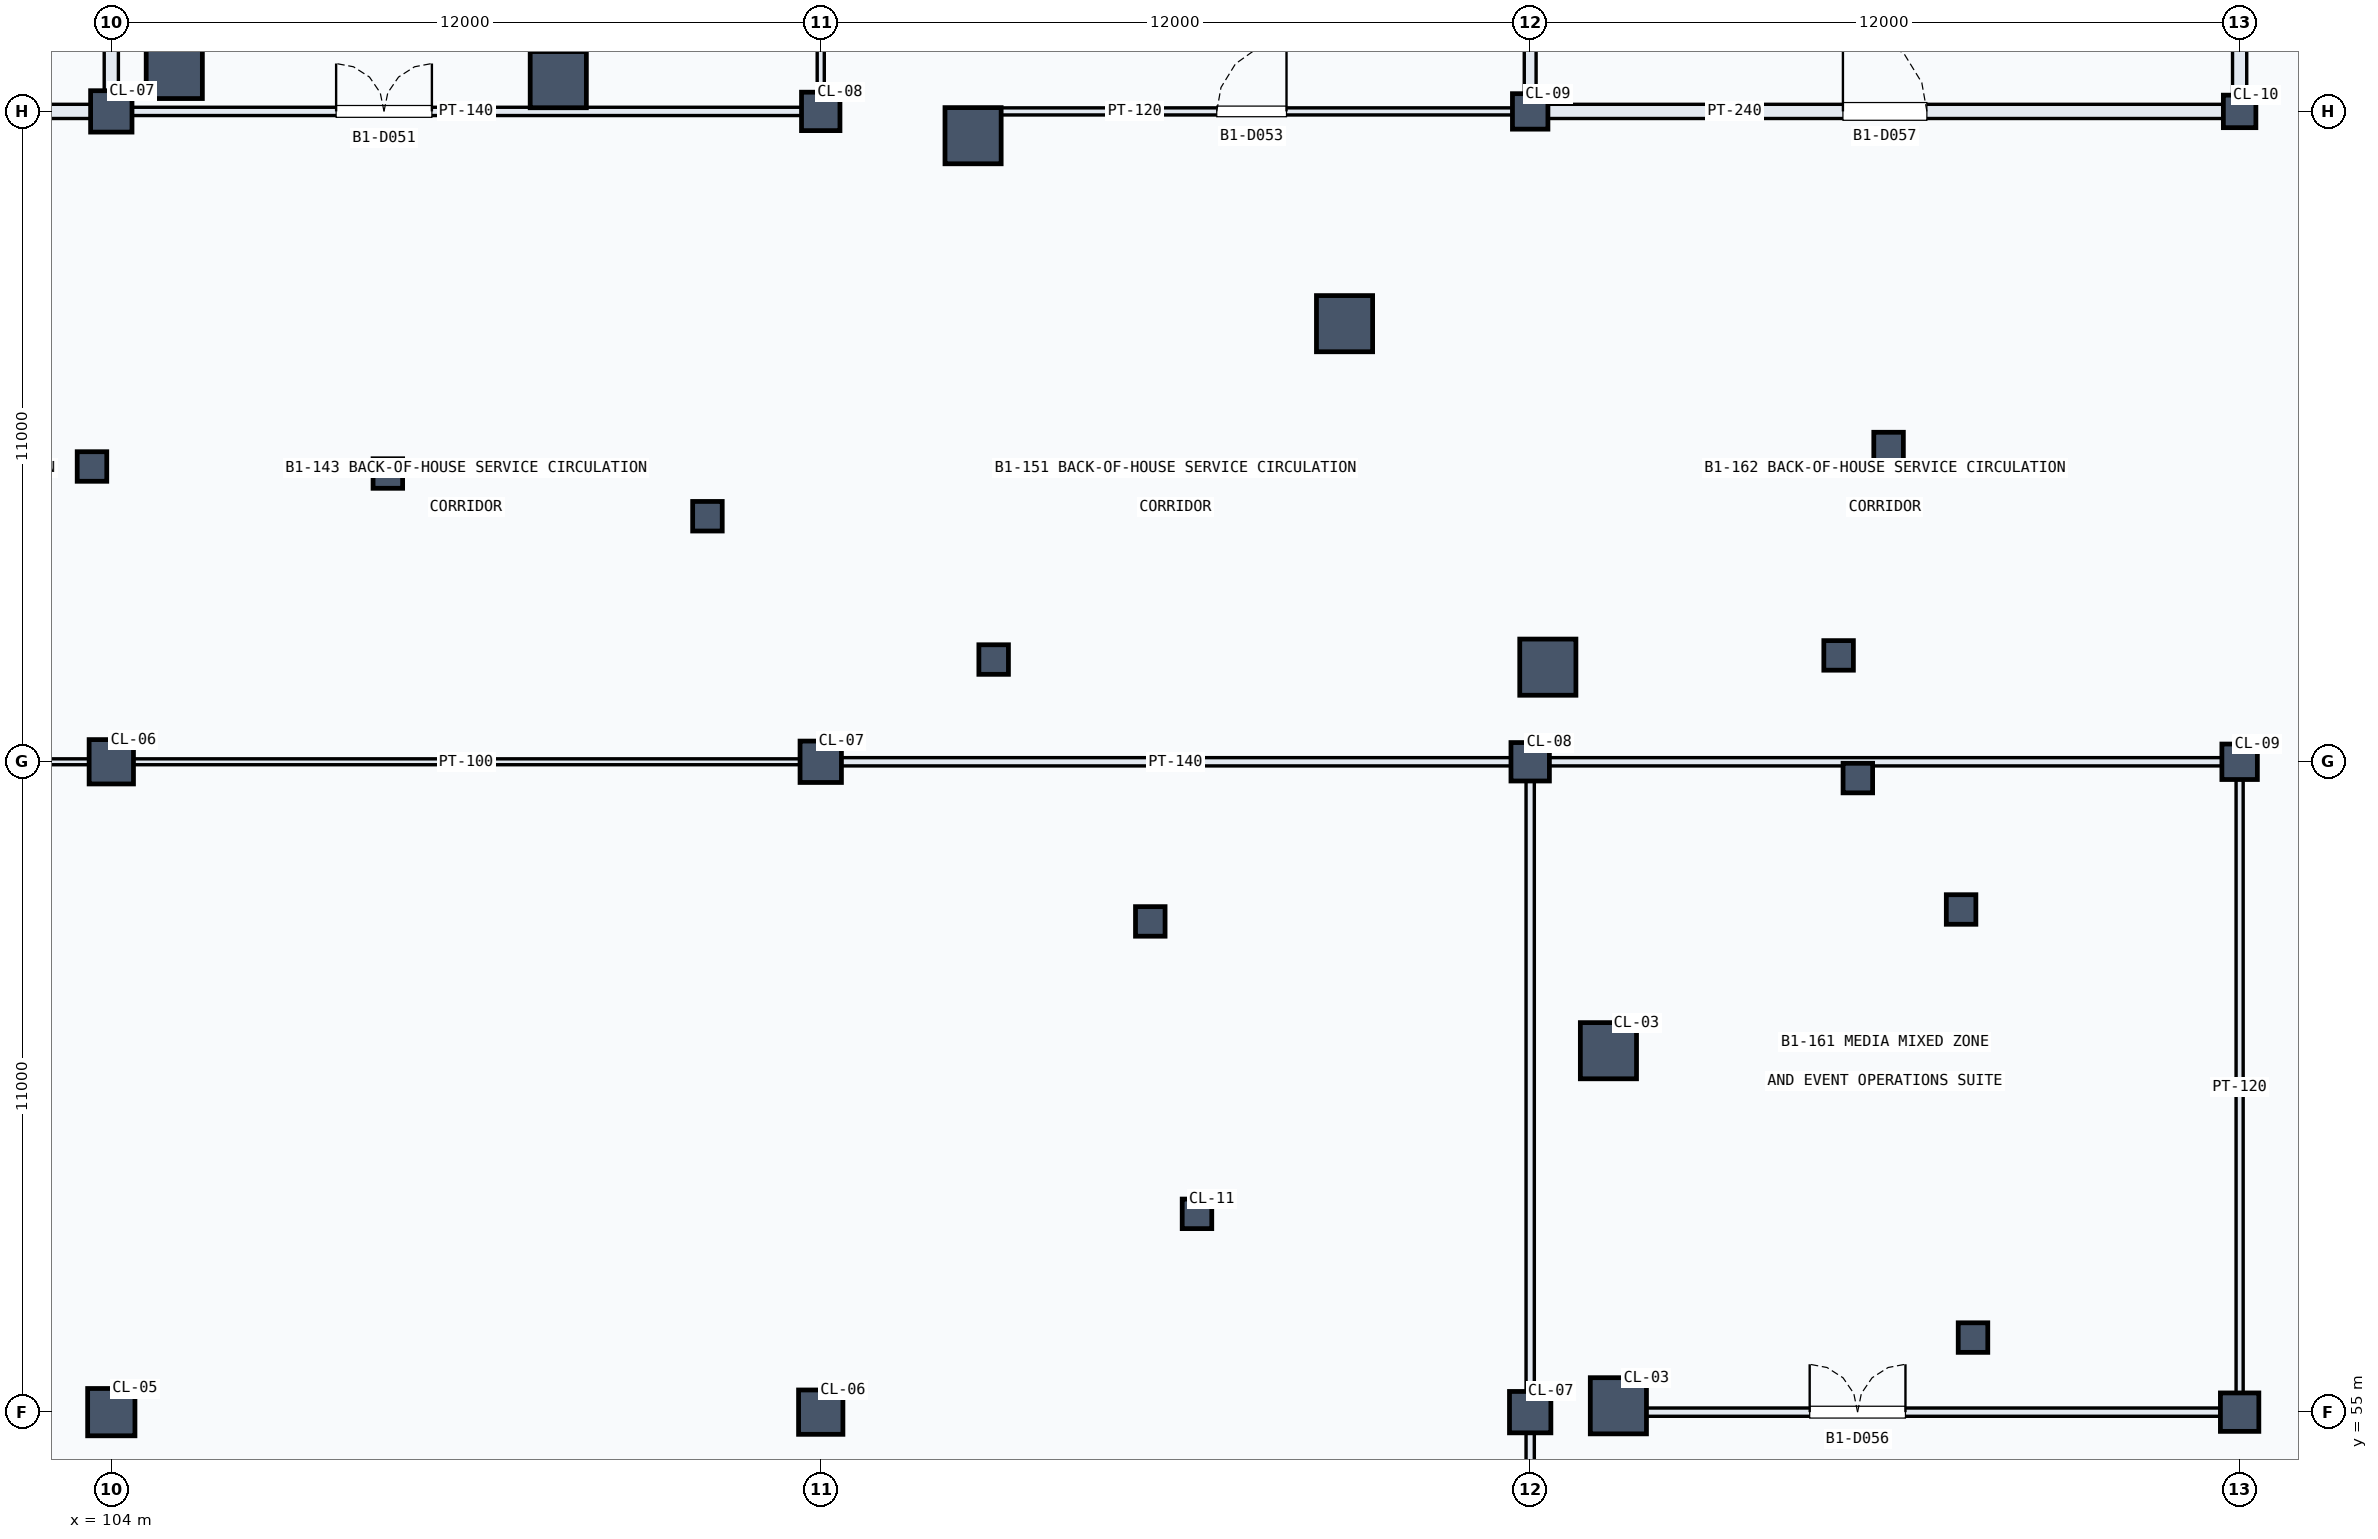
"""IFC4 building model, lengths in metres.
Left out: names, types, materials, properties, quantities, classifications, styles, units other than length and angle.
Written with IfcOpenShell. Run it as: python <this file> out.ifc"""

import sys

from ifc_helpers import new_model, si_unit, direction, frame, frame_2d, origin, origin_2d, place, context, subcontext, project, spatial, rectangle, extrude, element, fill, save


model = new_model("IFC4")
c1 = context("Model", 3, precision=1e-05, world=origin(), true_north=direction((0.0, 1.0)))
c2 = subcontext(c1, "Body", "Model", "MODEL_VIEW")
j1 = project(units=[si_unit("LENGTHUNIT", "METRE"), si_unit("PLANEANGLEUNIT", "RADIAN")], contexts=[c1])
p1 = place(None, origin())
s1 = spatial("IfcSite", under=j1, at=p1, CompositionType="ELEMENT")
p2 = place(p1, origin())
s2 = spatial("IfcBuilding", under=s1, at=p2, CompositionType="ELEMENT")
p3 = place(p2, frame((0.0, 0.0, -5.4)))
s3 = spatial("IfcBuildingStorey", under=s2, at=p3, CompositionType="ELEMENT", Elevation=-5.4)
p4 = place(p3, frame((104.0, 55.0, 0.0), z_axis=(0.0, 0.0, 1.0), x_axis=(1.0, 0.0, 0.0)))
e1 = element("IfcColumn", 1, at=p4, inside=s3, PredefinedType="COLUMN", context=c2, shape_type="SweptSolid", body=[
    extrude(rectangle(XDim=0.8, YDim=0.8, at=origin_2d()), origin(), (0.0, 0.0, 1.0), 5.4),
])
p5 = place(p3, frame((104.0, 66.0, 0.0), z_axis=(0.0, 0.0, 1.0), x_axis=(1.0, 0.0, 0.0)))
e2 = element("IfcColumn", 2, at=p5, inside=s3, PredefinedType="COLUMN", context=c2, shape_type="SweptSolid", body=[
    extrude(rectangle(XDim=0.75, YDim=0.75, at=origin_2d()), origin(), (0.0, 0.0, 1.0), 5.4),
])
p6 = place(p3, frame((104.0, 77.0, 0.0), z_axis=(0.0, 0.0, 1.0), x_axis=(1.0, 0.0, 0.0)))
e3 = element("IfcColumn", 3, at=p6, inside=s3, PredefinedType="COLUMN", context=c2, shape_type="SweptSolid", body=[
    extrude(rectangle(XDim=0.7, YDim=0.7, at=origin_2d()), origin(), (0.0, 0.0, 1.0), 5.4),
])
p7 = place(p3, frame((116.0, 55.0, 0.0), z_axis=(0.0, 0.0, 1.0), x_axis=(1.0, 0.0, 0.0)))
e4 = element("IfcColumn", 4, at=p7, inside=s3, PredefinedType="COLUMN", context=c2, shape_type="SweptSolid", body=[
    extrude(rectangle(XDim=0.75, YDim=0.75, at=origin_2d()), origin(), (0.0, 0.0, 1.0), 5.4),
])
p8 = place(p3, frame((116.0, 66.0, 0.0), z_axis=(0.0, 0.0, 1.0), x_axis=(1.0, 0.0, 0.0)))
e5 = element("IfcColumn", 5, at=p8, inside=s3, PredefinedType="COLUMN", context=c2, shape_type="SweptSolid", body=[
    extrude(rectangle(XDim=0.7, YDim=0.7, at=origin_2d()), origin(), (0.0, 0.0, 1.0), 5.4),
])
p9 = place(p3, frame((116.0, 77.0, 0.0), z_axis=(0.0, 0.0, 1.0), x_axis=(1.0, 0.0, 0.0)))
e6 = element("IfcColumn", 6, at=p9, inside=s3, PredefinedType="COLUMN", context=c2, shape_type="SweptSolid", body=[
    extrude(rectangle(XDim=0.65, YDim=0.65, at=origin_2d()), origin(), (0.0, 0.0, 1.0), 5.4),
])
p10 = place(p3, frame((128.0, 55.0, 0.0), z_axis=(0.0, 0.0, 1.0), x_axis=(1.0, 0.0, 0.0)))
e7 = element("IfcColumn", 7, at=p10, inside=s3, PredefinedType="COLUMN", context=c2, shape_type="SweptSolid", body=[
    extrude(rectangle(XDim=0.7, YDim=0.7, at=origin_2d()), origin(), (0.0, 0.0, 1.0), 5.4),
])
p11 = place(p3, frame((128.0, 66.0, 0.0), z_axis=(0.0, 0.0, 1.0), x_axis=(1.0, 0.0, 0.0)))
e8 = element("IfcColumn", 8, at=p11, inside=s3, PredefinedType="COLUMN", context=c2, shape_type="SweptSolid", body=[
    extrude(rectangle(XDim=0.65, YDim=0.65, at=origin_2d()), origin(), (0.0, 0.0, 1.0), 5.4),
])
p12 = place(p3, frame((128.0, 77.0, 0.0), z_axis=(0.0, 0.0, 1.0), x_axis=(1.0, 0.0, 0.0)))
e9 = element("IfcColumn", 9, at=p12, inside=s3, PredefinedType="COLUMN", context=c2, shape_type="SweptSolid", body=[
    extrude(rectangle(XDim=0.6, YDim=0.6, at=origin_2d()), origin(), (0.0, 0.0, 1.0), 5.4),
])
p13 = place(p3, frame((140.0, 55.0, 0.0), z_axis=(0.0, 0.0, 1.0), x_axis=(1.0, 0.0, 0.0)))
e10 = element("IfcColumn", 10, at=p13, inside=s3, PredefinedType="COLUMN", context=c2, shape_type="SweptSolid", body=[
    extrude(rectangle(XDim=0.65, YDim=0.65, at=origin_2d()), origin(), (0.0, 0.0, 1.0), 5.4),
])
p14 = place(p3, frame((140.0, 66.0, 0.0), z_axis=(0.0, 0.0, 1.0), x_axis=(1.0, 0.0, 0.0)))
e11 = element("IfcColumn", 11, at=p14, inside=s3, PredefinedType="COLUMN", context=c2, shape_type="SweptSolid", body=[
    extrude(rectangle(XDim=0.6, YDim=0.6, at=origin_2d()), origin(), (0.0, 0.0, 1.0), 5.4),
])
p15 = place(p3, frame((140.0, 77.0, 0.0), z_axis=(0.0, 0.0, 1.0), x_axis=(1.0, 0.0, 0.0)))
e12 = element("IfcColumn", 12, at=p15, inside=s3, PredefinedType="COLUMN", context=c2, shape_type="SweptSolid", body=[
    extrude(rectangle(XDim=0.55, YDim=0.55, at=origin_2d()), origin(), (0.0, 0.0, 1.0), 5.4),
])
for number, where, z_axis, x_axis in (
    (13, (122.364, 58.354, 0.0), (0.0, 0.0, 1.0), (1.0, 0.0, 0.0)),
    (14, (121.574, 63.3, 0.0), (0.0, 0.0, 1.0), (1.0, 0.0, 0.0)),
    (15, (118.925, 67.729, 0.0), (0.0, 0.0, 1.0), (1.0, 0.0, 0.0)),
    (16, (114.083, 70.153, 0.0), (0.0, 0.0, 1.0), (1.0, 0.0, 0.0)),
    (17, (108.678, 70.875, 0.0), (0.0, 0.0, 1.0), (1.0, 0.0, 0.0)),
    (18, (103.673, 70.994, 0.0), (0.0, 0.0, 1.0), (1.0, 0.0, 0.0)),
    (19, (135.49, 56.261, 0.0), (0.0, 0.0, 1.0), (1.0, 0.0, 0.0)),
    (20, (135.289, 63.502, 0.0), (0.0, 0.0, 1.0), (1.0, 0.0, 0.0)),
    (21, (134.062, 71.323, 0.0), (0.0, 0.0, 1.0), (1.0, 0.0, 0.0)),
):
    element("IfcColumn", number, at=place(p3, frame(where, z_axis=z_axis, x_axis=x_axis)), inside=s3, PredefinedType="COLUMN", context=c2, shape_type="SweptSolid", body=[
        extrude(rectangle(XDim=0.5, YDim=0.5, at=origin_2d()), origin(), (0.0, 0.0, 1.0), 5.4),
    ])
for number, where, z_axis, x_axis in (
    (22, (129.492, 55.108, 0.0), (0.0, 0.0, 1.0), (1.0, 0.0, 0.0)),
    (23, (129.323, 61.113, 0.0), (0.0, 0.0, 1.0), (1.0, 0.0, 0.0)),
    (24, (128.299, 67.6, 0.0), (0.0, 0.0, 1.0), (1.0, 0.0, 0.0)),
    (25, (124.86, 73.41, 0.0), (0.0, 0.0, 1.0), (1.0, 0.0, 0.0)),
    (26, (118.577, 76.589, 0.0), (0.0, 0.0, 1.0), (1.0, 0.0, 0.0)),
    (27, (111.56, 77.537, 0.0), (0.0, 0.0, 1.0), (1.0, 0.0, 0.0)),
    (28, (105.065, 77.692, 0.0), (0.0, 0.0, 1.0), (1.0, 0.0, 0.0)),
):
    element("IfcColumn", number, at=place(p3, frame(where, z_axis=z_axis, x_axis=x_axis)), inside=s3, PredefinedType="COLUMN", context=c2, shape_type="SweptSolid", body=[
        extrude(rectangle(XDim=0.95, YDim=0.95, at=origin_2d()), origin(), (0.0, 0.0, 1.0), 5.4),
    ])
for number, where, z_axis, x_axis in (
    (29, (133.542, 65.725, 0.0), (0.0, 0.0, 1.0), (1.0, 0.0, 0.0)),
    (30, (133.217, 67.799, 0.0), (0.0, 0.0, 1.0), (1.0, 0.0, 0.0)),
):
    element("IfcColumn", number, at=place(p3, frame(where, z_axis=z_axis, x_axis=x_axis)), inside=s3, PredefinedType="COLUMN", context=c2, shape_type="SweptSolid", body=[
        extrude(rectangle(XDim=0.5, YDim=0.5, at=origin_2d()), origin(), (0.0, 0.0, 1.0), 5.4),
    ])
p16 = place(p3, frame((94.22, 66.0, 0.0), z_axis=(0.0, 0.0, 1.0), x_axis=(1.0, 0.0, 0.0)))
e31 = element("IfcWall", 31, at=p16, inside=s3, PredefinedType="PARTITIONING", context=c2, shape_type="SweptSolid", body=[
    extrude(rectangle(XDim=9.56, YDim=0.1, at=frame_2d((4.78, 0.0))), origin(), (0.0, 0.0, 1.0), 4.346),
])
p17 = place(p3, frame((104.22, 66.0, 0.0), z_axis=(0.0, 0.0, 1.0), x_axis=(1.0, 0.0, 0.0)))
e32 = element("IfcWall", 32, at=p17, inside=s3, PredefinedType="PARTITIONING", context=c2, shape_type="SweptSolid", body=[
    extrude(rectangle(XDim=11.56, YDim=0.1, at=frame_2d((5.78, 0.0))), origin(), (0.0, 0.0, 1.0), 4.13),
])
p18 = place(p3, frame((116.22, 66.0, 0.0), z_axis=(0.0, 0.0, 1.0), x_axis=(1.0, 0.0, 0.0)))
e33 = element("IfcWall", 33, at=p18, inside=s3, PredefinedType="PARTITIONING", context=c2, shape_type="SweptSolid", body=[
    extrude(rectangle(XDim=11.56, YDim=0.14, at=frame_2d((5.78, 0.0))), origin(), (0.0, 0.0, 1.0), 4.13),
])
p19 = place(p3, frame((128.0, 44.22, 0.0), z_axis=(0.0, 0.0, 1.0), x_axis=(0.0, 1.0, 0.0)))
e34 = element("IfcWall", 34, at=p19, inside=s3, PredefinedType="PARTITIONING", context=c2, shape_type="SweptSolid", body=[
    extrude(rectangle(XDim=10.56, YDim=0.14, at=frame_2d((5.28, 0.0))), origin(), (0.0, 0.0, 1.0), 4.41),
])
p20 = place(p3, frame((94.22, 77.0, 0.0), z_axis=(0.0, 0.0, 1.0), x_axis=(1.0, 0.0, 0.0)))
e35 = element("IfcWall", 35, at=p20, inside=s3, PredefinedType="PARTITIONING", context=c2, shape_type="SweptSolid", body=[
    extrude(rectangle(XDim=9.56, YDim=0.24, at=frame_2d((4.78, 0.0))), origin(), (0.0, 0.0, 1.0), 4.346),
])
p21 = place(p20, frame((2.137, 0.0, 0.0)))
e36 = element("IfcOpeningElement", 36, at=p21, cuts=e35, PredefinedType="OPENING", context=c2, shape_type="SweptSolid", body=[
    extrude(rectangle(XDim=1.08, YDim=2.15, at=frame_2d((0.54, 1.075))), frame((0.0, 0.13, 0.0), z_axis=(0.0, -1.0, 0.0), x_axis=(1.0, 0.0, 0.0)), (0.0, 0.0, 1.0), 0.26),
])
p22 = place(p3, frame((104.22, 77.0, 0.0), z_axis=(0.0, 0.0, 1.0), x_axis=(1.0, 0.0, 0.0)))
e37 = element("IfcWall", 37, at=p22, inside=s3, PredefinedType="PARTITIONING", context=c2, shape_type="SweptSolid", body=[
    extrude(rectangle(XDim=11.56, YDim=0.14, at=frame_2d((5.78, 0.0))), origin(), (0.0, 0.0, 1.0), 4.08),
])
p23 = place(p22, frame((3.583, 0.0, 0.0)))
e38 = element("IfcOpeningElement", 38, at=p23, cuts=e37, PredefinedType="OPENING", context=c2, shape_type="SweptSolid", body=[
    extrude(rectangle(XDim=1.62, YDim=2.25, at=frame_2d((0.81, 1.125))), frame((0.0, 0.08, 0.0), z_axis=(0.0, -1.0, 0.0), x_axis=(1.0, 0.0, 0.0)), (0.0, 0.0, 1.0), 0.16),
])
p24 = place(p3, frame((118.797, 77.0, 0.0), z_axis=(0.0, 0.0, 1.0), x_axis=(1.0, 0.0, 0.0)))
e39 = element("IfcWall", 39, at=p24, inside=s3, PredefinedType="PARTITIONING", context=c2, shape_type="SweptSolid", body=[
    extrude(rectangle(XDim=8.983, YDim=0.12, at=frame_2d((4.492, 0.0))), origin(), (0.0, 0.0, 1.0), 4.08),
])
p25 = place(p24, frame((3.902, 0.0, 0.0)))
e40 = element("IfcOpeningElement", 40, at=p25, cuts=e39, PredefinedType="OPENING", context=c2, shape_type="SweptSolid", body=[
    extrude(rectangle(XDim=1.18, YDim=2.15, at=frame_2d((0.59, 1.075))), frame((0.0, 0.07, 0.0), z_axis=(0.0, -1.0, 0.0), x_axis=(1.0, 0.0, 0.0)), (0.0, 0.0, 1.0), 0.14),
])
p26 = place(p3, frame((129.712, 55.0, 0.0), z_axis=(0.0, 0.0, 1.0), x_axis=(1.0, 0.0, 0.0)))
e41 = element("IfcWall", 41, at=p26, inside=s3, PredefinedType="PARTITIONING", context=c2, shape_type="SweptSolid", body=[
    extrude(rectangle(XDim=10.068, YDim=0.14, at=frame_2d((5.034, 0.0))), origin(), (0.0, 0.0, 1.0), 4.33),
])
p27 = place(p26, frame((3.016, 0.0, 0.0)))
e42 = element("IfcOpeningElement", 42, at=p27, cuts=e41, PredefinedType="OPENING", context=c2, shape_type="SweptSolid", body=[
    extrude(rectangle(XDim=1.62, YDim=2.25, at=frame_2d((0.81, 1.125))), frame((0.0, 0.08, 0.0), z_axis=(0.0, -1.0, 0.0), x_axis=(1.0, 0.0, 0.0)), (0.0, 0.0, 1.0), 0.16),
])
p28 = place(p3, frame((128.22, 66.0, 0.0), z_axis=(0.0, 0.0, 1.0), x_axis=(1.0, 0.0, 0.0)))
e43 = element("IfcWall", 43, at=p28, inside=s3, PredefinedType="PARTITIONING", context=c2, shape_type="SweptSolid", body=[
    extrude(rectangle(XDim=11.56, YDim=0.14, at=frame_2d((5.78, 0.0))), origin(), (0.0, 0.0, 1.0), 4.13),
])
p29 = place(p3, frame((140.0, 55.22, 0.0), z_axis=(0.0, 0.0, 1.0), x_axis=(0.0, 1.0, 0.0)))
e44 = element("IfcWall", 44, at=p29, inside=s3, PredefinedType="PARTITIONING", context=c2, shape_type="SweptSolid", body=[
    extrude(rectangle(XDim=10.56, YDim=0.12, at=frame_2d((5.28, 0.0))), origin(), (0.0, 0.0, 1.0), 4.13),
])
p30 = place(p3, frame((128.22, 77.0, 0.0), z_axis=(0.0, 0.0, 1.0), x_axis=(1.0, 0.0, 0.0)))
e45 = element("IfcWall", 45, at=p30, inside=s3, PredefinedType="PARTITIONING", context=c2, shape_type="SweptSolid", body=[
    extrude(rectangle(XDim=11.56, YDim=0.24, at=frame_2d((5.78, 0.0))), origin(), (0.0, 0.0, 1.0), 4.08),
])
p31 = place(p30, frame((5.07, 0.0, 0.0)))
e46 = element("IfcOpeningElement", 46, at=p31, cuts=e45, PredefinedType="OPENING", context=c2, shape_type="SweptSolid", body=[
    extrude(rectangle(XDim=1.42, YDim=2.25, at=frame_2d((0.71, 1.125))), frame((0.0, 0.13, 0.0), z_axis=(0.0, -1.0, 0.0), x_axis=(1.0, 0.0, 0.0)), (0.0, 0.0, 1.0), 0.26),
])
p32 = place(p3, frame((140.0, 77.22, 0.0), z_axis=(0.0, 0.0, 1.0), x_axis=(0.0, 1.0, 0.0)))
e47 = element("IfcWall", 47, at=p32, inside=s3, PredefinedType="PARTITIONING", context=c2, shape_type="SweptSolid", body=[
    extrude(rectangle(XDim=10.56, YDim=0.24, at=frame_2d((5.28, 0.0))), origin(), (0.0, 0.0, 1.0), 4.08),
])
p33 = place(p3, frame((128.0, 55.22, 0.0), z_axis=(0.0, 0.0, 1.0), x_axis=(0.0, 1.0, 0.0)))
e48 = element("IfcWall", 48, at=p33, inside=s3, PredefinedType="PARTITIONING", context=c2, shape_type="SweptSolid", body=[
    extrude(rectangle(XDim=10.56, YDim=0.14, at=frame_2d((5.28, 0.0))), origin(), (0.0, 0.0, 1.0), 4.28),
])
p34 = place(p3, frame((104.0, 77.22, 0.0), z_axis=(0.0, 0.0, 1.0), x_axis=(0.0, 1.0, 0.0)))
e49 = element("IfcWall", 49, at=p34, inside=s3, PredefinedType="PARTITIONING", context=c2, shape_type="SweptSolid", body=[
    extrude(rectangle(XDim=10.56, YDim=0.24, at=frame_2d((5.28, 0.0))), origin(), (0.0, 0.0, 1.0), 4.08),
])
p35 = place(p3, frame((116.0, 77.22, 0.0), z_axis=(0.0, 0.0, 1.0), x_axis=(0.0, 1.0, 0.0)))
e50 = element("IfcWall", 50, at=p35, inside=s3, PredefinedType="PARTITIONING", context=c2, shape_type="SweptSolid", body=[
    extrude(rectangle(XDim=10.56, YDim=0.12, at=frame_2d((5.28, 0.0))), origin(), (0.0, 0.0, 1.0), 4.08),
])
p36 = place(p3, frame((128.0, 77.22, 0.0), z_axis=(0.0, 0.0, 1.0), x_axis=(0.0, 1.0, 0.0)))
e51 = element("IfcWall", 51, at=p36, inside=s3, PredefinedType="PARTITIONING", context=c2, shape_type="SweptSolid", body=[
    extrude(rectangle(XDim=10.56, YDim=0.2, at=frame_2d((5.28, 0.0))), origin(), (0.0, 0.0, 1.0), 4.08),
])
p37 = place(p23, origin())
e52 = element("IfcDoor", 52, at=p37, inside=s3, OperationType="DOUBLE_DOOR_SINGLE_SWING", PredefinedType="DOOR", context=c2, shape_type="SweptSolid", body=[
    extrude(rectangle(XDim=1.62, YDim=2.25, at=frame_2d((0.81, 1.125))), frame((0.0, 0.025, 0.0), z_axis=(0.0, -1.0, 0.0), x_axis=(1.0, 0.0, 0.0)), (0.0, 0.0, 1.0), 0.05),
])
fill(e38, e52)
p38 = place(p25, origin())
e53 = element("IfcDoor", 53, at=p38, inside=s3, OperationType="SINGLE_SWING_RIGHT", PredefinedType="DOOR", context=c2, shape_type="SweptSolid", body=[
    extrude(rectangle(XDim=1.18, YDim=2.15, at=frame_2d((0.59, 1.075))), frame((0.0, 0.025, 0.0), z_axis=(0.0, -1.0, 0.0), x_axis=(1.0, 0.0, 0.0)), (0.0, 0.0, 1.0), 0.05),
])
fill(e40, e53)
p39 = place(p27, origin())
e54 = element("IfcDoor", 54, at=p39, inside=s3, OperationType="DOUBLE_DOOR_SINGLE_SWING", PredefinedType="DOOR", context=c2, shape_type="SweptSolid", body=[
    extrude(rectangle(XDim=1.62, YDim=2.25, at=frame_2d((0.81, 1.125))), frame((0.0, 0.025, 0.0), z_axis=(0.0, -1.0, 0.0), x_axis=(1.0, 0.0, 0.0)), (0.0, 0.0, 1.0), 0.05),
])
fill(e42, e54)
p40 = place(p31, origin())
e55 = element("IfcDoor", 55, at=p40, inside=s3, OperationType="SINGLE_SWING_LEFT", PredefinedType="DOOR", context=c2, shape_type="SweptSolid", body=[
    extrude(rectangle(XDim=1.42, YDim=2.25, at=frame_2d((0.71, 1.125))), frame((0.0, 0.025, 0.0), z_axis=(0.0, -1.0, 0.0), x_axis=(1.0, 0.0, 0.0)), (0.0, 0.0, 1.0), 0.05),
])
fill(e46, e55)
save(model, sys.argv[1])
